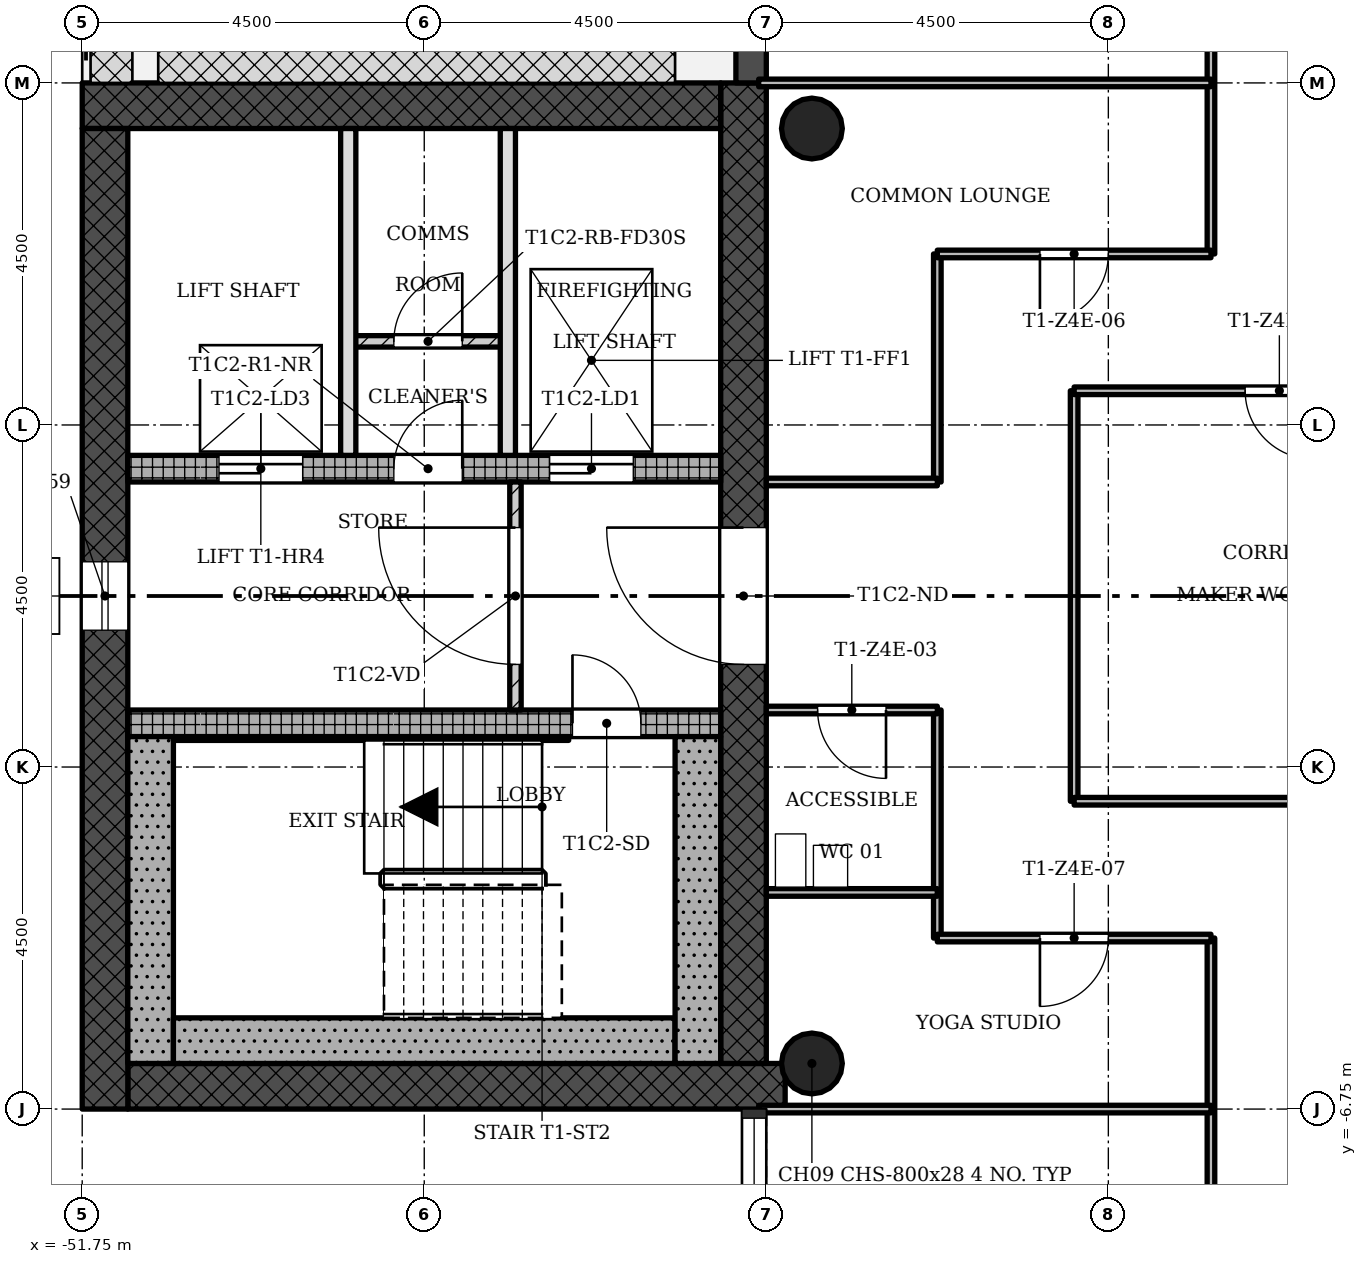
"""IFC4 building model, lengths in metres.
Left out: names, types, materials, properties, quantities, classifications, styles, units other than length and angle.
Written with IfcOpenShell. Run it as: python <this file> out.ifc"""

import sys

from ifc_helpers import new_model, si_unit, direction, frame, frame_2d, origin, origin_2d, place, context, subcontext, project, spatial, rectangle, hollow_circle, extrude, element, fill, save


model = new_model("IFC4")
c1 = context("Model", 3, precision=1e-05, world=origin(), true_north=direction((0.0, 1.0)))
c2 = subcontext(c1, "Body", "Model", "MODEL_VIEW")
j1 = project(units=[si_unit("LENGTHUNIT", "METRE"), si_unit("PLANEANGLEUNIT", "RADIAN")], contexts=[c1])
p1 = place(None, origin())
s1 = spatial("IfcSite", under=j1, at=p1, CompositionType="ELEMENT")
p2 = place(p1, origin())
s2 = spatial("IfcBuilding", under=s1, at=p2, CompositionType="ELEMENT")
p3 = place(p2, frame((0.0, 0.0, 213.0)))
s3 = spatial("IfcBuildingStorey", under=s2, at=p3, CompositionType="ELEMENT", Elevation=213.0)
p4 = place(p3, frame((-51.15, -6.45, 0.0), z_axis=(0.0, 0.0, 1.0), x_axis=(1.0, 0.0, 0.0)))
e1 = element("IfcWall", 1, at=p4, inside=s3, PredefinedType="SHEAR", context=c2, shape_type="SweptSolid", body=[
    extrude(rectangle(XDim=8.648, YDim=0.6, at=frame_2d((4.324, 0.0))), origin(), (0.0, 0.0, 1.0), 3.4),
])
p5 = place(p3, frame((-43.05, -6.15, 0.0), z_axis=(0.0, 0.0, 1.0), x_axis=(0.0, 1.0, 0.0)))
e2 = element("IfcWall", 2, at=p5, inside=s3, PredefinedType="SHEAR", context=c2, shape_type="SweptSolid", body=[
    extrude(rectangle(XDim=12.9, YDim=0.6, at=frame_2d((6.45, 0.0))), origin(), (0.0, 0.0, 1.0), 3.4),
])
p6 = place(p5, frame((5.25, 0.0, 0.0)))
e3 = element("IfcOpeningElement", 3, at=p6, cuts=e2, PredefinedType="OPENING", context=c2, shape_type="SweptSolid", body=[
    extrude(rectangle(XDim=1.8, YDim=2.1, at=frame_2d((0.9, 1.05))), frame((0.0, 0.31, 0.0), z_axis=(0.0, -1.0, 0.0), x_axis=(1.0, 0.0, 0.0)), (0.0, 0.0, 1.0), 0.62),
])
p7 = place(p3, frame((-43.35, 6.45, 0.0), z_axis=(0.0, 0.0, 1.0), x_axis=(-1.0, 0.0, 0.0)))
e4 = element("IfcWall", 4, at=p7, inside=s3, PredefinedType="SHEAR", context=c2, shape_type="SweptSolid", body=[
    extrude(rectangle(XDim=8.4, YDim=0.6, at=frame_2d((4.2, 0.0))), origin(), (0.0, 0.0, 1.0), 3.4),
])
p8 = place(p3, frame((-51.45, 6.15, 0.0), z_axis=(0.0, 0.0, 1.0), x_axis=(0.0, -1.0, 0.0)))
e5 = element("IfcWall", 5, at=p8, inside=s3, PredefinedType="SHEAR", context=c2, shape_type="SweptSolid", body=[
    extrude(rectangle(XDim=12.9, YDim=0.6, at=frame_2d((6.45, 0.0))), origin(), (0.0, 0.0, 1.0), 3.4),
])
p9 = place(p8, frame((5.7, 0.0, 0.45)))
e6 = element("IfcOpeningElement", 6, at=p9, cuts=e5, PredefinedType="OPENING", context=c2, shape_type="SweptSolid", body=[
    extrude(rectangle(XDim=0.9, YDim=2.4, at=frame_2d((0.45, 1.2))), frame((0.0, 0.31, 0.0), z_axis=(0.0, -1.0, 0.0), x_axis=(1.0, 0.0, 0.0)), (0.0, 0.0, 1.0), 0.62),
])
p10 = place(p3, frame((-51.15, -1.675, 0.0), z_axis=(0.0, 0.0, 1.0), x_axis=(1.0, 0.0, 0.0)))
e7 = element("IfcWall", 7, at=p10, inside=s3, PredefinedType="SHEAR", context=c2, shape_type="SweptSolid", body=[
    extrude(rectangle(XDim=7.8, YDim=0.35, at=frame_2d((3.9, 0.0))), origin(), (0.0, 0.0, 1.0), 3.4),
])
p11 = place(p10, frame((5.85, 0.0, 0.0)))
e8 = element("IfcOpeningElement", 8, at=p11, cuts=e7, PredefinedType="OPENING", context=c2, shape_type="SweptSolid", body=[
    extrude(rectangle(XDim=0.9, YDim=2.1, at=frame_2d((0.45, 1.05))), frame((0.0, 0.185, 0.0), z_axis=(0.0, -1.0, 0.0), x_axis=(1.0, 0.0, 0.0)), (0.0, 0.0, 1.0), 0.37),
])
p12 = place(p3, frame((-51.15, 1.675, 0.0), z_axis=(0.0, 0.0, 1.0), x_axis=(1.0, 0.0, 0.0)))
e9 = element("IfcWall", 9, at=p12, inside=s3, PredefinedType="SHEAR", context=c2, shape_type="SweptSolid", body=[
    extrude(rectangle(XDim=7.8, YDim=0.35, at=frame_2d((3.9, 0.0))), origin(), (0.0, 0.0, 1.0), 3.4),
])
p13 = place(p12, frame((5.55, 0.0, 0.0)))
e10 = element("IfcOpeningElement", 10, at=p13, cuts=e9, PredefinedType="OPENING", context=c2, shape_type="SweptSolid", body=[
    extrude(rectangle(XDim=1.1, YDim=2.1, at=frame_2d((0.55, 1.05))), frame((0.0, 0.185, 0.0), z_axis=(0.0, -1.0, 0.0), x_axis=(1.0, 0.0, 0.0)), (0.0, 0.0, 1.0), 0.37),
])
p14 = place(p12, frame((1.2, 0.0, 0.0)))
e11 = element("IfcOpeningElement", 11, at=p14, cuts=e9, PredefinedType="OPENING", context=c2, shape_type="SweptSolid", body=[
    extrude(rectangle(XDim=1.1, YDim=2.1, at=frame_2d((0.55, 1.05))), frame((0.0, 0.185, 0.0), z_axis=(0.0, -1.0, 0.0), x_axis=(1.0, 0.0, 0.0)), (0.0, 0.0, 1.0), 0.37),
])
p15 = place(p12, frame((3.5, 0.0, 0.0)))
e12 = element("IfcOpeningElement", 12, at=p15, cuts=e9, PredefinedType="OPENING", context=c2, shape_type="SweptSolid", body=[
    extrude(rectangle(XDim=0.9, YDim=2.1, at=frame_2d((0.45, 1.05))), frame((0.0, 0.185, 0.0), z_axis=(0.0, -1.0, 0.0), x_axis=(1.0, 0.0, 0.0)), (0.0, 0.0, 1.0), 0.37),
])
for number, where, z_axis, x_axis in (
    (13, (-42.15, -6.15, 0.0), (0.0, 0.0, 1.0), (1.0, 0.0, 0.0)),
    (14, (-42.15, 6.15, 0.0), (0.0, 0.0, 1.0), (1.0, 0.0, 0.0)),
):
    element("IfcColumn", number, at=place(p3, frame(where, z_axis=z_axis, x_axis=x_axis)), inside=s3, PredefinedType="COLUMN", context=c2, shape_type="SweptSolid", body=[
        extrude(hollow_circle(Radius=0.4, WallThickness=0.028, at=origin_2d()), origin(), (0.0, 0.0, 1.0), 3.4),
    ])
p16 = place(p3, frame((-42.95, 11.25, -0.02), z_axis=(0.0, 0.0, 1.0), x_axis=(0.0, -1.0, 0.0)))
e15 = element("IfcWall", 15, at=p16, inside=s3, PredefinedType="STANDARD", context=c2, shape_type="SweptSolid", body=[
    extrude(rectangle(XDim=4.5, YDim=0.4, at=frame_2d((2.25, 0.0))), origin(), (0.0, 0.0, 1.0), 3.12),
])
p17 = place(p16, frame((1.35, 0.0, 0.02)))
e16 = element("IfcOpeningElement", 16, at=p17, cuts=e15, PredefinedType="OPENING", context=c2, shape_type="SweptSolid", body=[
    extrude(rectangle(XDim=1.8, YDim=2.1, at=frame_2d((0.9, 1.05))), frame((0.0, 0.21, 0.0), z_axis=(0.0, -1.0, 0.0), x_axis=(1.0, 0.0, 0.0)), (0.0, 0.0, 1.0), 0.42),
])
p18 = place(p3, frame((-46.05, 1.5, 0.0), z_axis=(0.0, 0.0, 1.0), x_axis=(0.0, -1.0, 0.0)))
e17 = element("IfcWall", 17, at=p18, inside=s3, PredefinedType="PARTITIONING", context=c2, shape_type="SweptSolid", body=[
    extrude(rectangle(XDim=3.0, YDim=0.15, at=frame_2d((1.5, 0.0))), origin(), (0.0, 0.0, 1.0), 3.0),
])
p19 = place(p18, frame((0.6, 0.0, 0.0)))
e18 = element("IfcOpeningElement", 18, at=p19, cuts=e17, PredefinedType="OPENING", context=c2, shape_type="SweptSolid", body=[
    extrude(rectangle(XDim=1.8, YDim=2.1, at=frame_2d((0.9, 1.05))), frame((0.0, 0.085, 0.0), z_axis=(0.0, -1.0, 0.0), x_axis=(1.0, 0.0, 0.0)), (0.0, 0.0, 1.0), 0.17),
])
for number, where, z_axis, x_axis in (
    (19, (-48.25, 6.15, 0.0), (0.0, 0.0, 1.0), (0.0, -1.0, 0.0)),
    (20, (-46.15, 6.15, 0.0), (0.0, 0.0, 1.0), (0.0, -1.0, 0.0)),
):
    element("IfcWall", number, at=place(p3, frame(where, z_axis=z_axis, x_axis=x_axis)), inside=s3, PredefinedType="SOLIDWALL", context=c2, shape_type="SweptSolid", body=[
        extrude(rectangle(XDim=4.3, YDim=0.2, at=frame_2d((2.15, 0.0))), origin(), (0.0, 0.0, 1.0), 3.0),
    ])
p20 = place(p3, frame((-46.15, 3.35, 0.0), z_axis=(0.0, 0.0, 1.0), x_axis=(-1.0, 0.0, 0.0)))
e21 = element("IfcWall", 21, at=p20, inside=s3, PredefinedType="PARTITIONING", context=c2, shape_type="SweptSolid", body=[
    extrude(rectangle(XDim=2.1, YDim=0.15, at=frame_2d((1.05, 0.0))), origin(), (0.0, 0.0, 1.0), 3.0),
])
p21 = place(p20, frame((0.6, 0.0, 0.0)))
e22 = element("IfcOpeningElement", 22, at=p21, cuts=e21, PredefinedType="OPENING", context=c2, shape_type="SweptSolid", body=[
    extrude(rectangle(XDim=0.9, YDim=2.1, at=frame_2d((0.45, 1.05))), frame((0.0, 0.085, 0.0), z_axis=(0.0, -1.0, 0.0), x_axis=(1.0, 0.0, 0.0)), (0.0, 0.0, 1.0), 0.17),
])
for number, where, z_axis, x_axis in (
    (23, (-40.5, -4.5, 0.0), (0.0, 0.0, 1.0), (0.0, 1.0, 0.0)),
    (24, (-40.5, 1.5, 0.0), (0.0, 0.0, 1.0), (0.0, 1.0, 0.0)),
):
    element("IfcWall", number, at=place(p3, frame(where, z_axis=z_axis, x_axis=x_axis)), inside=s3, PredefinedType="PARTITIONING", context=c2, shape_type="SweptSolid", body=[
        extrude(rectangle(XDim=3.0, YDim=0.1, at=frame_2d((1.5, 0.0))), origin(), (0.0, 0.0, 1.0), 3.0),
    ])
p22 = place(p3, frame((-38.7, -2.7, 0.0), z_axis=(0.0, 0.0, 1.0), x_axis=(0.0, 1.0, 0.0)))
e25 = element("IfcWall", 25, at=p22, inside=s3, PredefinedType="PARTITIONING", context=c2, shape_type="SweptSolid", body=[
    extrude(rectangle(XDim=5.4, YDim=0.1, at=frame_2d((2.7, 0.0))), origin(), (0.0, 0.0, 1.0), 3.0),
])
p23 = place(p3, frame((-36.9, -8.55, 0.0), z_axis=(0.0, 0.0, 1.0), x_axis=(0.0, 1.0, 0.0)))
e26 = element("IfcWall", 26, at=p23, inside=s3, PredefinedType="PARTITIONING", context=c2, shape_type="SweptSolid", body=[
    extrude(rectangle(XDim=4.05, YDim=0.1, at=frame_2d((2.025, 0.0))), origin(), (0.0, 0.0, 1.0), 3.0),
])
p24 = place(p3, frame((-36.9, 4.5, 0.0), z_axis=(0.0, 0.0, 1.0), x_axis=(0.0, 1.0, 0.0)))
e27 = element("IfcWall", 27, at=p24, inside=s3, PredefinedType="PARTITIONING", context=c2, shape_type="SweptSolid", body=[
    extrude(rectangle(XDim=6.75, YDim=0.1, at=frame_2d((3.375, 0.0))), origin(), (0.0, 0.0, 1.0), 3.0),
])
p25 = place(p24, frame((4.05, 0.0, 0.0)))
e28 = element("IfcOpeningElement", 28, at=p25, cuts=e27, PredefinedType="OPENING", context=c2, shape_type="SweptSolid", body=[
    extrude(rectangle(XDim=0.9, YDim=2.1, at=frame_2d((0.45, 1.05))), frame((0.0, 0.06, 0.0), z_axis=(0.0, -1.0, 0.0), x_axis=(1.0, 0.0, 0.0)), (0.0, 0.0, 1.0), 0.12),
])
p26 = place(p3, frame((-42.85, -6.75, 0.0), z_axis=(0.0, 0.0, 1.0), x_axis=(1.0, 0.0, 0.0)))
e29 = element("IfcWall", 29, at=p26, inside=s3, PredefinedType="PARTITIONING", context=c2, shape_type="SweptSolid", body=[
    extrude(rectangle(XDim=5.95, YDim=0.1, at=frame_2d((2.975, 0.0))), origin(), (0.0, 0.0, 1.0), 3.0),
])
p27 = place(p3, frame((-40.5, -4.5, 0.0), z_axis=(0.0, 0.0, 1.0), x_axis=(1.0, 0.0, 0.0)))
e30 = element("IfcWall", 30, at=p27, inside=s3, PredefinedType="PARTITIONING", context=c2, shape_type="SweptSolid", body=[
    extrude(rectangle(XDim=3.6, YDim=0.1, at=frame_2d((1.8, 0.0))), origin(), (0.0, 0.0, 1.0), 3.0),
])
p28 = place(p27, frame((1.35, 0.0, 0.0)))
e31 = element("IfcOpeningElement", 31, at=p28, cuts=e30, PredefinedType="OPENING", context=c2, shape_type="SweptSolid", body=[
    extrude(rectangle(XDim=0.9, YDim=2.1, at=frame_2d((0.45, 1.05))), frame((0.0, 0.06, 0.0), z_axis=(0.0, -1.0, 0.0), x_axis=(1.0, 0.0, 0.0)), (0.0, 0.0, 1.0), 0.12),
])
p29 = place(p3, frame((-42.75, -3.9, 0.0), z_axis=(0.0, 0.0, 1.0), x_axis=(1.0, 0.0, 0.0)))
e32 = element("IfcWall", 32, at=p29, inside=s3, PredefinedType="PARTITIONING", context=c2, shape_type="SweptSolid", body=[
    extrude(rectangle(XDim=2.25, YDim=0.1, at=frame_2d((1.125, 0.0))), origin(), (0.0, 0.0, 1.0), 3.0),
])
p30 = place(p3, frame((-38.7, -2.7, 0.0), z_axis=(0.0, 0.0, 1.0), x_axis=(1.0, 0.0, 0.0)))
e33 = element("IfcWall", 33, at=p30, inside=s3, PredefinedType="PARTITIONING", context=c2, shape_type="SweptSolid", body=[
    extrude(rectangle(XDim=5.4, YDim=0.1, at=frame_2d((2.7, 0.0))), origin(), (0.0, 0.0, 1.0), 3.0),
])
p31 = place(p3, frame((-42.75, -1.5, 0.0), z_axis=(0.0, 0.0, 1.0), x_axis=(1.0, 0.0, 0.0)))
e34 = element("IfcWall", 34, at=p31, inside=s3, PredefinedType="PARTITIONING", context=c2, shape_type="SweptSolid", body=[
    extrude(rectangle(XDim=2.25, YDim=0.1, at=frame_2d((1.125, 0.0))), origin(), (0.0, 0.0, 1.0), 3.0),
])
p32 = place(p31, frame((0.675, 0.0, 0.0)))
e35 = element("IfcOpeningElement", 35, at=p32, cuts=e34, PredefinedType="OPENING", context=c2, shape_type="SweptSolid", body=[
    extrude(rectangle(XDim=0.9, YDim=2.1, at=frame_2d((0.45, 1.05))), frame((0.0, 0.06, 0.0), z_axis=(0.0, -1.0, 0.0), x_axis=(1.0, 0.0, 0.0)), (0.0, 0.0, 1.0), 0.12),
])
p33 = place(p3, frame((-42.75, 1.5, 0.0), z_axis=(0.0, 0.0, 1.0), x_axis=(1.0, 0.0, 0.0)))
e36 = element("IfcWall", 36, at=p33, inside=s3, PredefinedType="PARTITIONING", context=c2, shape_type="SweptSolid", body=[
    extrude(rectangle(XDim=2.25, YDim=0.1, at=frame_2d((1.125, 0.0))), origin(), (0.0, 0.0, 1.0), 3.0),
])
p34 = place(p3, frame((-38.7, 2.7, 0.0), z_axis=(0.0, 0.0, 1.0), x_axis=(1.0, 0.0, 0.0)))
e37 = element("IfcWall", 37, at=p34, inside=s3, PredefinedType="PARTITIONING", context=c2, shape_type="SweptSolid", body=[
    extrude(rectangle(XDim=5.4, YDim=0.1, at=frame_2d((2.7, 0.0))), origin(), (0.0, 0.0, 1.0), 3.0),
])
p35 = place(p34, frame((2.25, 0.0, 0.0)))
e38 = element("IfcOpeningElement", 38, at=p35, cuts=e37, PredefinedType="OPENING", context=c2, shape_type="SweptSolid", body=[
    extrude(rectangle(XDim=0.9, YDim=2.1, at=frame_2d((0.45, 1.05))), frame((0.0, 0.06, 0.0), z_axis=(0.0, -1.0, 0.0), x_axis=(1.0, 0.0, 0.0)), (0.0, 0.0, 1.0), 0.12),
])
p36 = place(p3, frame((-40.5, 4.5, 0.0), z_axis=(0.0, 0.0, 1.0), x_axis=(1.0, 0.0, 0.0)))
e39 = element("IfcWall", 39, at=p36, inside=s3, PredefinedType="PARTITIONING", context=c2, shape_type="SweptSolid", body=[
    extrude(rectangle(XDim=3.6, YDim=0.1, at=frame_2d((1.8, 0.0))), origin(), (0.0, 0.0, 1.0), 3.0),
])
p37 = place(p36, frame((1.35, 0.0, 0.0)))
e40 = element("IfcOpeningElement", 40, at=p37, cuts=e39, PredefinedType="OPENING", context=c2, shape_type="SweptSolid", body=[
    extrude(rectangle(XDim=0.9, YDim=2.1, at=frame_2d((0.45, 1.05))), frame((0.0, 0.06, 0.0), z_axis=(0.0, -1.0, 0.0), x_axis=(1.0, 0.0, 0.0)), (0.0, 0.0, 1.0), 0.12),
])
p38 = place(p3, frame((-42.85, 6.75, 0.0), z_axis=(0.0, 0.0, 1.0), x_axis=(1.0, 0.0, 0.0)))
e41 = element("IfcWall", 41, at=p38, inside=s3, PredefinedType="PARTITIONING", context=c2, shape_type="SweptSolid", body=[
    extrude(rectangle(XDim=5.95, YDim=0.1, at=frame_2d((2.975, 0.0))), origin(), (0.0, 0.0, 1.0), 3.0),
])
p39 = place(p3, frame((-50.85, -1.85, 0.0), z_axis=(0.0, 0.0, 1.0), x_axis=(0.0, -1.0, 0.0)))
e42 = element("IfcWall", 42, at=p39, inside=s3, PredefinedType="SHEAR", context=c2, shape_type="SweptSolid", body=[
    extrude(rectangle(XDim=4.3, YDim=0.6, at=frame_2d((2.15, 0.0))), origin(), (0.0, 0.0, 1.0), 3.4),
])
p40 = place(p3, frame((-43.95, -5.85, 0.0), z_axis=(0.0, 0.0, 1.0), x_axis=(-1.0, 0.0, 0.0)))
e43 = element("IfcWall", 43, at=p40, inside=s3, PredefinedType="SHEAR", context=c2, shape_type="SweptSolid", body=[
    extrude(rectangle(XDim=6.6, YDim=0.6, at=frame_2d((3.3, 0.0))), origin(), (0.0, 0.0, 1.0), 3.4),
])
p41 = place(p3, frame((-43.65, -1.85, 0.0), z_axis=(0.0, 0.0, 1.0), x_axis=(0.0, -1.0, 0.0)))
e44 = element("IfcWall", 44, at=p41, inside=s3, PredefinedType="SHEAR", context=c2, shape_type="SweptSolid", body=[
    extrude(rectangle(XDim=4.3, YDim=0.6, at=frame_2d((2.15, 0.0))), origin(), (0.0, 0.0, 1.0), 3.4),
])
p42 = place(p3, frame((-45.35, -1.875, 0.0), z_axis=(0.0, 0.0, 1.0), x_axis=(-1.0, 0.0, 0.0)))
e45 = element("IfcWall", 45, at=p42, inside=s3, PredefinedType="SHEAR", context=c2, shape_type="SweptSolid", body=[
    extrude(rectangle(XDim=5.2, YDim=0.05, at=frame_2d((2.6, 0.0))), origin(), (0.0, 0.0, 1.0), 3.4),
])
p43 = place(p9, origin())
e46 = element("IfcWindow", 46, at=p43, inside=s3, PartitioningType="SINGLE_PANEL", PredefinedType="WINDOW", context=c2, shape_type="SweptSolid", body=[
    extrude(rectangle(XDim=0.9, YDim=2.4, at=frame_2d((0.45, 1.2))), frame((0.0, 0.03, 0.0), z_axis=(0.0, -1.0, 0.0), x_axis=(1.0, 0.0, 0.0)), (0.0, 0.0, 1.0), 0.06),
])
fill(e6, e46)
p44 = place(p19, origin())
e47 = element("IfcDoor", 47, at=p44, inside=s3, OperationType="SINGLE_SWING_LEFT", PredefinedType="DOOR", context=c2, shape_type="SweptSolid", body=[
    extrude(rectangle(XDim=1.8, YDim=2.1, at=frame_2d((0.9, 1.05))), frame((0.0, 0.025, 0.0), z_axis=(0.0, -1.0, 0.0), x_axis=(1.0, 0.0, 0.0)), (0.0, 0.0, 1.0), 0.05),
])
fill(e18, e47)
p45 = place(p21, origin())
e48 = element("IfcDoor", 48, at=p45, inside=s3, OperationType="SINGLE_SWING_LEFT", PredefinedType="DOOR", context=c2, shape_type="SweptSolid", body=[
    extrude(rectangle(XDim=0.9, YDim=2.1, at=frame_2d((0.45, 1.05))), frame((0.0, 0.025, 0.0), z_axis=(0.0, -1.0, 0.0), x_axis=(1.0, 0.0, 0.0)), (0.0, 0.0, 1.0), 0.05),
])
fill(e22, e48)
p46 = place(p35, origin())
e49 = element("IfcDoor", 49, at=p46, inside=s3, OperationType="SINGLE_SWING_RIGHT", PredefinedType="DOOR", context=c2, shape_type="SweptSolid", body=[
    extrude(rectangle(XDim=0.9, YDim=2.1, at=frame_2d((0.45, 1.05))), frame((0.0, 0.025, 0.0), z_axis=(0.0, -1.0, 0.0), x_axis=(1.0, 0.0, 0.0)), (0.0, 0.0, 1.0), 0.05),
])
fill(e38, e49)
p47 = place(p32, origin())
e50 = element("IfcDoor", 50, at=p47, inside=s3, OperationType="SINGLE_SWING_RIGHT", PredefinedType="DOOR", context=c2, shape_type="SweptSolid", body=[
    extrude(rectangle(XDim=0.9, YDim=2.1, at=frame_2d((0.45, 1.05))), frame((0.0, 0.025, 0.0), z_axis=(0.0, -1.0, 0.0), x_axis=(1.0, 0.0, 0.0)), (0.0, 0.0, 1.0), 0.05),
])
fill(e35, e50)
p48 = place(p37, origin())
e51 = element("IfcDoor", 51, at=p48, inside=s3, OperationType="SINGLE_SWING_LEFT", PredefinedType="DOOR", context=c2, shape_type="SweptSolid", body=[
    extrude(rectangle(XDim=0.9, YDim=2.1, at=frame_2d((0.45, 1.05))), frame((0.0, 0.025, 0.0), z_axis=(0.0, -1.0, 0.0), x_axis=(1.0, 0.0, 0.0)), (0.0, 0.0, 1.0), 0.05),
])
fill(e40, e51)
p49 = place(p28, origin())
e52 = element("IfcDoor", 52, at=p49, inside=s3, OperationType="SINGLE_SWING_LEFT", PredefinedType="DOOR", context=c2, shape_type="SweptSolid", body=[
    extrude(rectangle(XDim=0.9, YDim=2.1, at=frame_2d((0.45, 1.05))), frame((0.0, 0.025, 0.0), z_axis=(0.0, -1.0, 0.0), x_axis=(1.0, 0.0, 0.0)), (0.0, 0.0, 1.0), 0.05),
])
fill(e31, e52)
p50 = place(p11, origin())
e53 = element("IfcDoor", 53, at=p50, inside=s3, OperationType="SINGLE_SWING_RIGHT", PredefinedType="DOOR", context=c2, shape_type="SweptSolid", body=[
    extrude(rectangle(XDim=0.9, YDim=2.1, at=frame_2d((0.45, 1.05))), frame((0.0, 0.025, 0.0), z_axis=(0.0, -1.0, 0.0), x_axis=(1.0, 0.0, 0.0)), (0.0, 0.0, 1.0), 0.05),
])
fill(e8, e53)
p51 = place(p13, origin())
e54 = element("IfcDoor", 54, at=p51, inside=s3, OperationType="SLIDING_TO_LEFT", PredefinedType="DOOR", context=c2, shape_type="SweptSolid", body=[
    extrude(rectangle(XDim=1.1, YDim=2.1, at=frame_2d((0.55, 1.05))), frame((0.0, 0.025, 0.0), z_axis=(0.0, -1.0, 0.0), x_axis=(1.0, 0.0, 0.0)), (0.0, 0.0, 1.0), 0.05),
])
fill(e10, e54)
p52 = place(p14, origin())
e55 = element("IfcDoor", 55, at=p52, inside=s3, OperationType="SLIDING_TO_LEFT", PredefinedType="DOOR", context=c2, shape_type="SweptSolid", body=[
    extrude(rectangle(XDim=1.1, YDim=2.1, at=frame_2d((0.55, 1.05))), frame((0.0, 0.025, 0.0), z_axis=(0.0, -1.0, 0.0), x_axis=(1.0, 0.0, 0.0)), (0.0, 0.0, 1.0), 0.05),
])
fill(e11, e55)
p53 = place(p15, origin())
e56 = element("IfcDoor", 56, at=p53, inside=s3, OperationType="SINGLE_SWING_LEFT", PredefinedType="DOOR", context=c2, shape_type="SweptSolid", body=[
    extrude(rectangle(XDim=0.9, YDim=2.1, at=frame_2d((0.45, 1.05))), frame((0.0, 0.025, 0.0), z_axis=(0.0, -1.0, 0.0), x_axis=(1.0, 0.0, 0.0)), (0.0, 0.0, 1.0), 0.05),
])
fill(e12, e56)
p54 = place(p6, origin())
e57 = element("IfcDoor", 57, at=p54, inside=s3, OperationType="SINGLE_SWING_LEFT", PredefinedType="DOOR", context=c2, shape_type="SweptSolid", body=[
    extrude(rectangle(XDim=1.8, YDim=2.1, at=frame_2d((0.9, 1.05))), frame((0.0, 0.025, 0.0), z_axis=(0.0, -1.0, 0.0), x_axis=(1.0, 0.0, 0.0)), (0.0, 0.0, 1.0), 0.05),
])
fill(e3, e57)
save(model, sys.argv[1])
